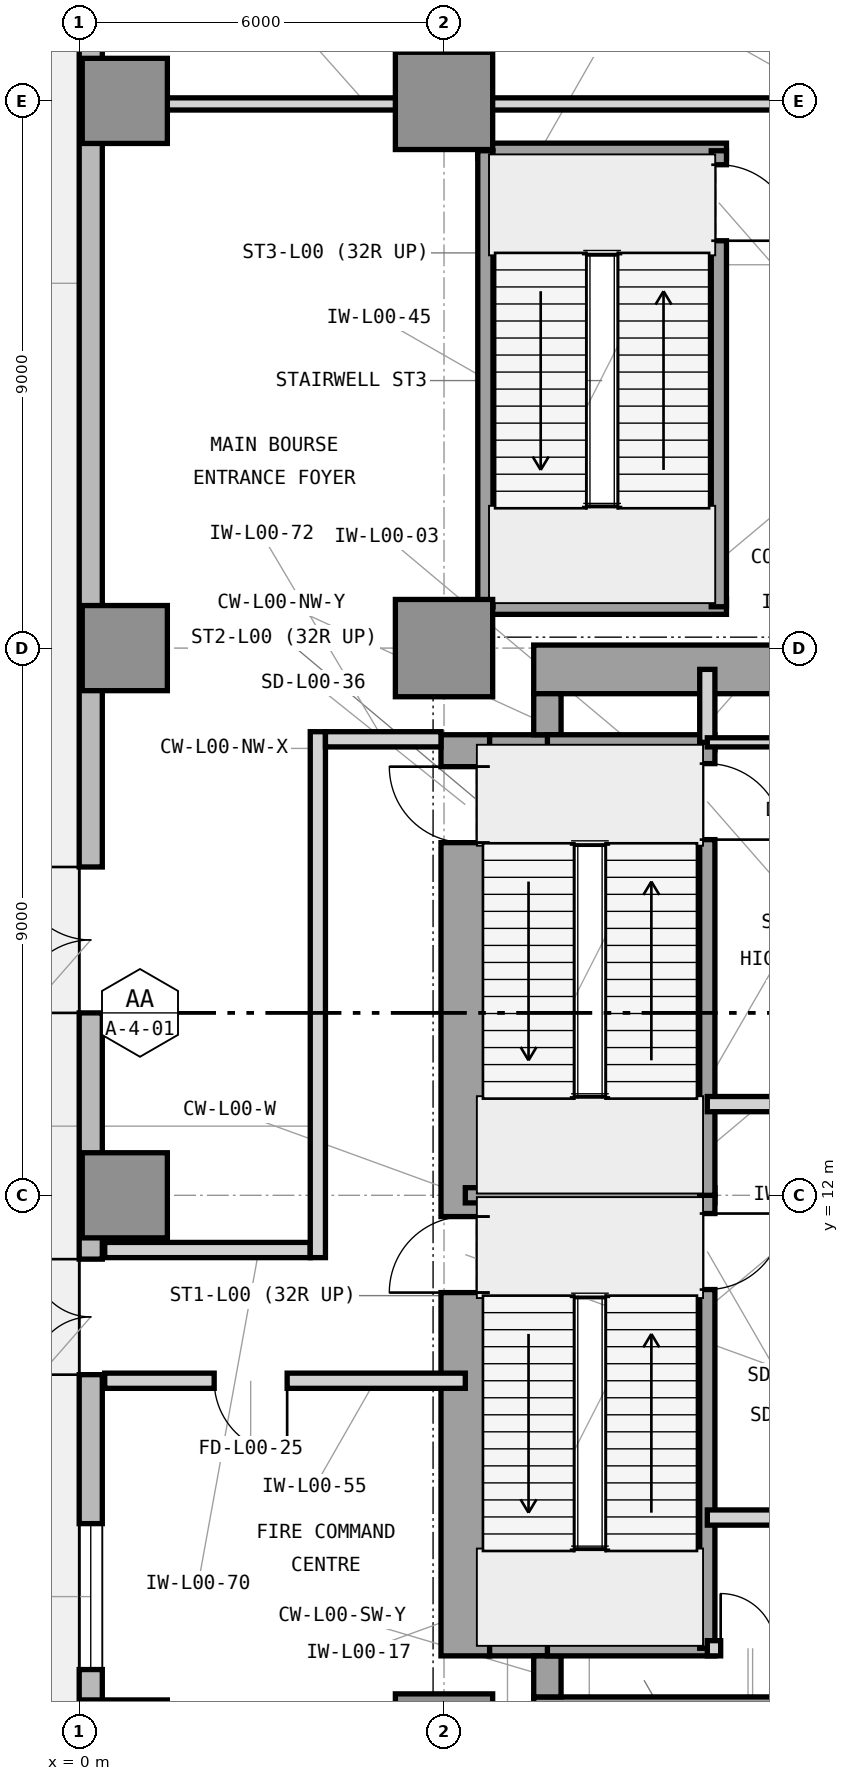
"""IFC4 building model, lengths in metres.
Left out: names, types, materials, properties, quantities, classifications, styles, units other than length and angle.
Written with IfcOpenShell. Run it as: python <this file> out.ifc"""

import sys

from ifc_helpers import new_model, si_unit, direction, frame, frame_2d, origin, origin_2d, place, context, subcontext, project, spatial, rectangle, extrude, element, fill, save


model = new_model("IFC4")
c1 = context("Model", 3, precision=1e-05, world=origin(), true_north=direction((0.0, 1.0)))
c2 = subcontext(c1, "Body", "Model", "MODEL_VIEW")
j1 = project(units=[si_unit("LENGTHUNIT", "METRE"), si_unit("PLANEANGLEUNIT", "RADIAN")], contexts=[c1])
p1 = place(None, origin())
s1 = spatial("IfcSite", under=j1, at=p1, CompositionType="ELEMENT")
p2 = place(p1, origin())
s2 = spatial("IfcBuilding", under=s1, at=p2, CompositionType="ELEMENT")
p3 = place(p2, origin())
s3 = spatial("IfcBuildingStorey", under=s2, at=p3, CompositionType="ELEMENT", Elevation=0.0)
p4 = place(p3, frame((7.475, 3.35, 0.0), z_axis=(0.0, 0.0, 1.0), x_axis=(1.0, 0.0, 0.0)))
e1 = element("IfcWall", 1, at=p4, inside=s3, PredefinedType="SHEAR", context=c2, shape_type="SweptSolid", body=[
    extrude(rectangle(XDim=16.575, YDim=0.8, at=frame_2d((8.288, 0.0))), origin(), (0.0, 0.0, 1.0), 5.4),
])
p5 = place(p3, frame((6.35, 4.425, 0.0), z_axis=(0.0, 0.0, 1.0), x_axis=(0.0, 1.0, 0.0)))
e2 = element("IfcWall", 2, at=p5, inside=s3, PredefinedType="SHEAR", context=c2, shape_type="SweptSolid", body=[
    extrude(rectangle(XDim=15.15, YDim=0.8, at=frame_2d((7.575, 0.0))), origin(), (0.0, 0.0, 1.0), 5.4),
])
p6 = place(p5, frame((5.975, 0.0, 0.0)))
e3 = element("IfcOpeningElement", 3, at=p6, cuts=e2, PredefinedType="OPENING", context=c2, shape_type="SweptSolid", body=[
    extrude(rectangle(XDim=1.25, YDim=2.2, at=frame_2d((0.625, 1.1))), frame((0.0, 0.41, 0.0), z_axis=(0.0, -1.0, 0.0), x_axis=(1.0, 0.0, 0.0)), (0.0, 0.0, 1.0), 0.82),
])
p7 = place(p5, frame((13.375, 0.0, 0.0)))
e4 = element("IfcOpeningElement", 4, at=p7, cuts=e2, PredefinedType="OPENING", context=c2, shape_type="SweptSolid", body=[
    extrude(rectangle(XDim=1.25, YDim=2.2, at=frame_2d((0.625, 1.1))), frame((0.0, 0.41, 0.0), z_axis=(0.0, -1.0, 0.0), x_axis=(1.0, 0.0, 0.0)), (0.0, 0.0, 1.0), 0.82),
])
p8 = place(p3, frame((7.475, 20.65, 0.0), z_axis=(0.0, 0.0, 1.0), x_axis=(1.0, 0.0, 0.0)))
e5 = element("IfcWall", 5, at=p8, inside=s3, PredefinedType="SHEAR", context=c2, shape_type="SweptSolid", body=[
    extrude(rectangle(XDim=12.325, YDim=0.8, at=frame_2d((6.163, 0.0))), origin(), (0.0, 0.0, 1.0), 5.4),
])
p9 = place(p3, frame((6.75, 4.65, 0.0), z_axis=(0.0, 0.0, 1.0), x_axis=(1.0, 0.0, 0.0)))
e6 = element("IfcWall", 6, at=p9, inside=s3, PredefinedType="SHEAR", context=c2, shape_type="SweptSolid", body=[
    extrude(rectangle(XDim=1.175, YDim=0.45, at=frame_2d((0.587, 0.0))), origin(), (0.0, 0.0, 1.0), 5.4),
])
p10 = place(p3, frame((7.7, 3.75, 0.0), z_axis=(0.0, 0.0, 1.0), x_axis=(0.0, 1.0, 0.0)))
e7 = element("IfcWall", 7, at=p10, inside=s3, PredefinedType="SHEAR", context=c2, shape_type="SweptSolid", body=[
    extrude(rectangle(XDim=0.675, YDim=0.45, at=frame_2d((0.337, 0.0))), origin(), (0.0, 0.0, 1.0), 5.4),
])
p11 = place(p3, frame((6.75, 19.35, 0.0), z_axis=(0.0, 0.0, 1.0), x_axis=(1.0, 0.0, 0.0)))
e8 = element("IfcWall", 8, at=p11, inside=s3, PredefinedType="SHEAR", context=c2, shape_type="SweptSolid", body=[
    extrude(rectangle(XDim=1.175, YDim=0.45, at=frame_2d((0.587, 0.0))), origin(), (0.0, 0.0, 1.0), 5.4),
])
p12 = place(p3, frame((7.7, 19.575, 0.0), z_axis=(0.0, 0.0, 1.0), x_axis=(0.0, 1.0, 0.0)))
e9 = element("IfcWall", 9, at=p12, inside=s3, PredefinedType="SHEAR", context=c2, shape_type="SweptSolid", body=[
    extrude(rectangle(XDim=0.675, YDim=0.45, at=frame_2d((0.337, 0.0))), origin(), (0.0, 0.0, 1.0), 5.4),
])
for number, where, z_axis, x_axis in (
    (10, (0.75, 3.0, 0.0), (0.0, 0.0, 1.0), (1.0, 0.0, 0.0)),
    (11, (0.75, 12.0, 0.0), (0.0, 0.0, 1.0), (1.0, 0.0, 0.0)),
    (12, (0.75, 21.0, 0.0), (0.0, 0.0, 1.0), (1.0, 0.0, 0.0)),
    (13, (0.75, 30.0, 0.0), (0.0, 0.0, 1.0), (1.0, 0.0, 0.0)),
):
    element("IfcColumn", number, at=place(p3, frame(where, z_axis=z_axis, x_axis=x_axis)), inside=s3, PredefinedType="COLUMN", context=c2, shape_type="SweptSolid", body=[
        extrude(rectangle(XDim=1.4, YDim=1.4, at=origin_2d()), origin(), (0.0, 0.0, 1.0), 5.4),
    ])
for number, where, z_axis, x_axis in (
    (14, (6.0, 3.0, 0.0), (0.0, 0.0, 1.0), (1.0, 0.0, 0.0)),
    (15, (6.0, 21.0, 0.0), (0.0, 0.0, 1.0), (1.0, 0.0, 0.0)),
    (16, (6.0, 30.0, 0.0), (0.0, 0.0, 1.0), (1.0, 0.0, 0.0)),
):
    element("IfcColumn", number, at=place(p3, frame(where, z_axis=z_axis, x_axis=x_axis)), inside=s3, PredefinedType="COLUMN", context=c2, shape_type="SweptSolid", body=[
        extrude(rectangle(XDim=1.6, YDim=1.6, at=origin_2d()), origin(), (0.0, 0.0, 1.0), 5.4),
    ])
p13 = place(p3, frame((0.19, 51.0, 0.0), z_axis=(0.0, 0.0, 1.0), x_axis=(0.0, -1.0, 0.0)))
e17 = element("IfcWall", 17, at=p13, inside=s3, PredefinedType="STANDARD", context=c2, shape_type="SweptSolid", body=[
    extrude(rectangle(XDim=48.0, YDim=0.38, at=frame_2d((24.0, 0.0))), origin(), (0.0, 0.0, 1.0), 5.1),
])
p14 = place(p13, frame((33.6, 0.0, 0.0)))
e18 = element("IfcOpeningElement", 18, at=p14, cuts=e17, PredefinedType="OPENING", context=c2, shape_type="SweptSolid", body=[
    extrude(rectangle(XDim=2.4, YDim=2.8, at=frame_2d((1.2, 1.4))), frame((0.0, 0.2, 0.0), z_axis=(0.0, -1.0, 0.0), x_axis=(1.0, 0.0, 0.0)), (0.0, 0.0, 1.0), 0.4),
])
p15 = place(p13, frame((40.05, 0.0, 0.0)))
e19 = element("IfcOpeningElement", 19, at=p15, cuts=e17, PredefinedType="OPENING", context=c2, shape_type="SweptSolid", body=[
    extrude(rectangle(XDim=1.9, YDim=2.4, at=frame_2d((0.95, 1.2))), frame((0.0, 0.2, 0.0), z_axis=(0.0, -1.0, 0.0), x_axis=(1.0, 0.0, 0.0)), (0.0, 0.0, 1.0), 0.4),
])
p16 = place(p13, frame((44.4, 0.0, 1.0)))
e20 = element("IfcOpeningElement", 20, at=p16, cuts=e17, PredefinedType="OPENING", context=c2, shape_type="SweptSolid", body=[
    extrude(rectangle(XDim=2.4, YDim=2.9, at=frame_2d((1.2, 1.45))), frame((0.0, 0.2, 0.0), z_axis=(0.0, -1.0, 0.0), x_axis=(1.0, 0.0, 0.0)), (0.0, 0.0, 1.0), 0.4),
])
p17 = place(p3, frame((6.35, 12.0, 0.0), z_axis=(0.0, 0.0, 1.0), x_axis=(1.0, 0.0, 0.0)))
e21 = element("IfcWall", 21, at=p17, inside=s3, PredefinedType="SHEAR", context=c2, shape_type="SweptSolid", body=[
    extrude(rectangle(XDim=4.105, YDim=0.25, at=frame_2d((2.052, 0.0))), origin(), (0.0, 0.0, 1.0), 5.4),
])
for number, where, z_axis, x_axis in (
    (22, (7.7, 4.55, 0.0), (0.0, 0.0, 1.0), (1.0, 0.0, 0.0)),
    (23, (7.7, 19.45, 0.0), (0.0, 0.0, 1.0), (1.0, 0.0, 0.0)),
):
    element("IfcWall", number, at=place(p3, frame(where, z_axis=z_axis, x_axis=x_axis)), inside=s3, PredefinedType="SHEAR", context=c2, shape_type="SweptSolid", body=[
        extrude(rectangle(XDim=2.755, YDim=0.25, at=frame_2d((1.377, 0.0))), origin(), (0.0, 0.0, 1.0), 5.4),
    ])
p18 = place(p3, frame((10.33, 4.55, 0.0), z_axis=(0.0, 0.0, 1.0), x_axis=(0.0, 1.0, 0.0)))
e24 = element("IfcWall", 24, at=p18, inside=s3, PredefinedType="SHEAR", context=c2, shape_type="SweptSolid", body=[
    extrude(rectangle(XDim=7.45, YDim=0.25, at=frame_2d((3.725, 0.0))), origin(), (0.0, 0.0, 1.0), 5.4),
])
p19 = place(p18, frame((5.9, 0.0, 0.0)))
e25 = element("IfcOpeningElement", 25, at=p19, cuts=e24, PredefinedType="OPENING", context=c2, shape_type="SweptSolid", body=[
    extrude(rectangle(XDim=1.25, YDim=2.2, at=frame_2d((0.625, 1.1))), frame((0.0, 0.135, 0.0), z_axis=(0.0, -1.0, 0.0), x_axis=(1.0, 0.0, 0.0)), (0.0, 0.0, 1.0), 0.27),
])
p20 = place(p3, frame((10.33, 12.0, 0.0), z_axis=(0.0, 0.0, 1.0), x_axis=(0.0, 1.0, 0.0)))
e26 = element("IfcWall", 26, at=p20, inside=s3, PredefinedType="SHEAR", context=c2, shape_type="SweptSolid", body=[
    extrude(rectangle(XDim=7.45, YDim=0.25, at=frame_2d((3.725, 0.0))), origin(), (0.0, 0.0, 1.0), 5.4),
])
p21 = place(p20, frame((5.85, 0.0, 0.0)))
e27 = element("IfcOpeningElement", 27, at=p21, cuts=e26, PredefinedType="OPENING", context=c2, shape_type="SweptSolid", body=[
    extrude(rectangle(XDim=1.25, YDim=2.2, at=frame_2d((0.625, 1.1))), frame((0.0, 0.135, 0.0), z_axis=(0.0, -1.0, 0.0), x_axis=(1.0, 0.0, 0.0)), (0.0, 0.0, 1.0), 0.27),
])
p22 = place(p3, frame((10.33, 4.55, 0.0), z_axis=(0.0, 0.0, 1.0), x_axis=(1.0, 0.0, 0.0)))
e28 = element("IfcWall", 28, at=p22, inside=s3, PredefinedType="PARTITIONING", context=c2, shape_type="SweptSolid", body=[
    extrude(rectangle(XDim=1.49, YDim=0.25, at=frame_2d((0.745, 0.0))), origin(), (0.0, 0.0, 1.0), 5.09),
])
p23 = place(p22, frame((0.22, 0.0, 0.0)))
e29 = element("IfcOpeningElement", 29, at=p23, cuts=e28, PredefinedType="OPENING", context=c2, shape_type="SweptSolid", body=[
    extrude(rectangle(XDim=0.9, YDim=2.1, at=frame_2d((0.45, 1.05))), frame((0.0, 0.135, 0.0), z_axis=(0.0, -1.0, 0.0), x_axis=(1.0, 0.0, 0.0)), (0.0, 0.0, 1.0), 0.27),
])
p24 = place(p3, frame((10.33, 19.45, 0.0), z_axis=(0.0, 0.0, 1.0), x_axis=(0.0, 1.0, 0.0)))
e30 = element("IfcWall", 30, at=p24, inside=s3, PredefinedType="PARTITIONING", context=c2, shape_type="SweptSolid", body=[
    extrude(rectangle(XDim=1.2, YDim=0.25, at=frame_2d((0.6, 0.0))), origin(), (0.0, 0.0, 1.0), 4.234),
])
p25 = place(p3, frame((10.33, 13.5, 0.0), z_axis=(0.0, 0.0, 1.0), x_axis=(1.0, 0.0, 0.0)))
e31 = element("IfcWall", 31, at=p25, inside=s3, PredefinedType="PARTITIONING", context=c2, shape_type="SweptSolid", body=[
    extrude(rectangle(XDim=1.62, YDim=0.25, at=frame_2d((0.81, 0.0))), origin(), (0.0, 0.0, 1.0), 4.473),
])
p26 = place(p3, frame((10.33, 6.7, 0.0), z_axis=(0.0, 0.0, 1.0), x_axis=(1.0, 0.0, 0.0)))
e32 = element("IfcWall", 32, at=p26, inside=s3, PredefinedType="PARTITIONING", context=c2, shape_type="SweptSolid", body=[
    extrude(rectangle(XDim=1.49, YDim=0.25, at=frame_2d((0.745, 0.0))), origin(), (0.0, 0.0, 1.0), 4.473),
])
p27 = place(p3, frame((10.33, 19.45, 0.0), z_axis=(0.0, 0.0, 1.0), x_axis=(1.0, 0.0, 0.0)))
e33 = element("IfcWall", 33, at=p27, inside=s3, PredefinedType="PARTITIONING", context=c2, shape_type="SweptSolid", body=[
    extrude(rectangle(XDim=3.82, YDim=0.15, at=frame_2d((1.91, 0.0))), origin(), (0.0, 0.0, 1.0), 5.09),
])
p28 = place(p27, frame((1.25, 0.0, 0.0)))
e34 = element("IfcOpeningElement", 34, at=p28, cuts=e33, PredefinedType="OPENING", context=c2, shape_type="SweptSolid", body=[
    extrude(rectangle(XDim=0.95, YDim=2.1, at=frame_2d((0.475, 1.05))), frame((0.0, 0.085, 0.0), z_axis=(0.0, -1.0, 0.0), x_axis=(1.0, 0.0, 0.0)), (0.0, 0.0, 1.0), 0.17),
])
for number, where, z_axis, x_axis in (
    (35, (6.555, 21.68, 0.0), (0.0, 0.0, 1.0), (1.0, 0.0, 0.0)),
    (36, (6.555, 29.18, 0.0), (0.0, 0.0, 1.0), (1.0, 0.0, 0.0)),
):
    element("IfcWall", number, at=place(p3, frame(where, z_axis=z_axis, x_axis=x_axis)), inside=s3, PredefinedType="SHEAR", context=c2, shape_type="SweptSolid", body=[
        extrude(rectangle(XDim=4.09, YDim=0.25, at=frame_2d((2.045, 0.0))), origin(), (0.0, 0.0, 1.0), 5.4),
    ])
p29 = place(p3, frame((6.68, 21.68, 0.0), z_axis=(0.0, 0.0, 1.0), x_axis=(0.0, 1.0, 0.0)))
e37 = element("IfcWall", 37, at=p29, inside=s3, PredefinedType="SHEAR", context=c2, shape_type="SweptSolid", body=[
    extrude(rectangle(XDim=7.5, YDim=0.25, at=frame_2d((3.75, 0.0))), origin(), (0.0, 0.0, 1.0), 5.4),
])
p30 = place(p3, frame((10.52, 21.68, 0.0), z_axis=(0.0, 0.0, 1.0), x_axis=(0.0, 1.0, 0.0)))
e38 = element("IfcWall", 38, at=p30, inside=s3, PredefinedType="SHEAR", context=c2, shape_type="SweptSolid", body=[
    extrude(rectangle(XDim=7.5, YDim=0.25, at=frame_2d((3.75, 0.0))), origin(), (0.0, 0.0, 1.0), 5.4),
])
p31 = place(p30, frame((6.02, 0.0, 0.0)))
e39 = element("IfcOpeningElement", 39, at=p31, cuts=e38, PredefinedType="OPENING", context=c2, shape_type="SweptSolid", body=[
    extrude(rectangle(XDim=1.25, YDim=2.2, at=frame_2d((0.625, 1.1))), frame((0.0, 0.135, 0.0), z_axis=(0.0, -1.0, 0.0), x_axis=(1.0, 0.0, 0.0)), (0.0, 0.0, 1.0), 0.27),
])
p32 = place(p3, frame((0.42, 8.95, 0.0), z_axis=(0.0, 0.0, 1.0), x_axis=(1.0, 0.0, 0.0)))
e40 = element("IfcWall", 40, at=p32, inside=s3, PredefinedType="PARTITIONING", context=c2, shape_type="SweptSolid", body=[
    extrude(rectangle(XDim=5.93, YDim=0.25, at=frame_2d((2.965, 0.0))), origin(), (0.0, 0.0, 1.0), 4.473),
])
p33 = place(p32, frame((1.8, 0.0, 0.0)))
e41 = element("IfcOpeningElement", 41, at=p33, cuts=e40, PredefinedType="OPENING", context=c2, shape_type="SweptSolid", body=[
    extrude(rectangle(XDim=1.2, YDim=2.2, at=frame_2d((0.6, 1.1))), frame((0.0, 0.135, 0.0), z_axis=(0.0, -1.0, 0.0), x_axis=(1.0, 0.0, 0.0)), (0.0, 0.0, 1.0), 0.27),
])
p34 = place(p3, frame((0.42, 29.95, 0.0), z_axis=(0.0, 0.0, 1.0), x_axis=(1.0, 0.0, 0.0)))
e42 = element("IfcWall", 42, at=p34, inside=s3, PredefinedType="PARTITIONING", context=c2, shape_type="SweptSolid", body=[
    extrude(rectangle(XDim=17.23, YDim=0.2, at=frame_2d((8.615, 0.0))), origin(), (0.0, 0.0, 1.0), 4.234),
])
p35 = place(p34, frame((11.1, 0.0, 0.0)))
e43 = element("IfcOpeningElement", 43, at=p35, cuts=e42, PredefinedType="OPENING", context=c2, shape_type="SweptSolid", body=[
    extrude(rectangle(XDim=2.0, YDim=2.5, at=frame_2d((1.0, 1.25))), frame((0.0, 0.11, 0.0), z_axis=(0.0, -1.0, 0.0), x_axis=(1.0, 0.0, 0.0)), (0.0, 0.0, 1.0), 0.22),
])
p36 = place(p3, frame((0.42, 11.1, 0.0), z_axis=(0.0, 0.0, 1.0), x_axis=(1.0, 0.0, 0.0)))
e44 = element("IfcWall", 44, at=p36, inside=s3, PredefinedType="PARTITIONING", context=c2, shape_type="SweptSolid", body=[
    extrude(rectangle(XDim=3.38, YDim=0.25, at=frame_2d((1.69, 0.0))), origin(), (0.0, 0.0, 1.0), 5.09),
])
p37 = place(p3, frame((3.925, 10.975, 0.0), z_axis=(0.0, 0.0, 1.0), x_axis=(0.0, 1.0, 0.0)))
e45 = element("IfcWall", 45, at=p37, inside=s3, PredefinedType="PARTITIONING", context=c2, shape_type="SweptSolid", body=[
    extrude(rectangle(XDim=8.65, YDim=0.25, at=frame_2d((4.325, 0.0))), origin(), (0.0, 0.0, 1.0), 5.09),
])
p38 = place(p3, frame((4.05, 19.5, 0.0), z_axis=(0.0, 0.0, 1.0), x_axis=(1.0, 0.0, 0.0)))
e46 = element("IfcWall", 46, at=p38, inside=s3, PredefinedType="PARTITIONING", context=c2, shape_type="SweptSolid", body=[
    extrude(rectangle(XDim=1.9, YDim=0.25, at=frame_2d((0.95, 0.0))), origin(), (0.0, 0.0, 1.0), 5.09),
])
p39 = place(p14, frame((2.4, 0.0, 0.0), z_axis=(0.0, 0.0, 1.0), x_axis=(-1.0, 0.0, 0.0)))
e47 = element("IfcDoor", 47, at=p39, inside=s3, OperationType="DOUBLE_DOOR_SINGLE_SWING", PredefinedType="DOOR", context=c2, shape_type="SweptSolid", body=[
    extrude(rectangle(XDim=2.4, YDim=2.8, at=frame_2d((1.2, 1.4))), frame((0.0, 0.025, 0.0), z_axis=(0.0, -1.0, 0.0), x_axis=(1.0, 0.0, 0.0)), (0.0, 0.0, 1.0), 0.05),
])
fill(e18, e47)
p40 = place(p15, frame((1.9, 0.0, 0.0), z_axis=(0.0, 0.0, 1.0), x_axis=(-1.0, 0.0, 0.0)))
e48 = element("IfcDoor", 48, at=p40, inside=s3, OperationType="DOUBLE_DOOR_SINGLE_SWING", PredefinedType="DOOR", context=c2, shape_type="SweptSolid", body=[
    extrude(rectangle(XDim=1.9, YDim=2.4, at=frame_2d((0.95, 1.2))), frame((0.0, 0.025, 0.0), z_axis=(0.0, -1.0, 0.0), x_axis=(1.0, 0.0, 0.0)), (0.0, 0.0, 1.0), 0.05),
])
fill(e19, e48)
p41 = place(p16, origin())
e49 = element("IfcWindow", 49, at=p41, inside=s3, PartitioningType="SINGLE_PANEL", PredefinedType="WINDOW", context=c2, shape_type="SweptSolid", body=[
    extrude(rectangle(XDim=2.4, YDim=2.9, at=frame_2d((1.2, 1.45))), frame((0.0, 0.11, 0.0), z_axis=(0.0, -1.0, 0.0), x_axis=(1.0, 0.0, 0.0)), (0.0, 0.0, 1.0), 0.06),
])
fill(e20, e49)
p42 = place(p19, frame((1.25, 0.0, 0.0), z_axis=(0.0, 0.0, 1.0), x_axis=(-1.0, 0.0, 0.0)))
e50 = element("IfcDoor", 50, at=p42, inside=s3, OperationType="SINGLE_SWING_LEFT", PredefinedType="DOOR", context=c2, shape_type="SweptSolid", body=[
    extrude(rectangle(XDim=1.25, YDim=2.2, at=frame_2d((0.625, 1.1))), frame((0.0, 0.025, 0.0), z_axis=(0.0, -1.0, 0.0), x_axis=(1.0, 0.0, 0.0)), (0.0, 0.0, 1.0), 0.05),
])
fill(e25, e50)
p43 = place(p21, frame((1.25, 0.0, 0.0), z_axis=(0.0, 0.0, 1.0), x_axis=(-1.0, 0.0, 0.0)))
e51 = element("IfcDoor", 51, at=p43, inside=s3, OperationType="SINGLE_SWING_RIGHT", PredefinedType="DOOR", context=c2, shape_type="SweptSolid", body=[
    extrude(rectangle(XDim=1.25, YDim=2.2, at=frame_2d((0.625, 1.1))), frame((0.0, 0.025, 0.0), z_axis=(0.0, -1.0, 0.0), x_axis=(1.0, 0.0, 0.0)), (0.0, 0.0, 1.0), 0.05),
])
fill(e27, e51)
p44 = place(p23, origin())
e52 = element("IfcDoor", 52, at=p44, inside=s3, OperationType="SINGLE_SWING_LEFT", PredefinedType="TRAPDOOR", context=c2, shape_type="SweptSolid", body=[
    extrude(rectangle(XDim=0.9, YDim=2.1, at=frame_2d((0.45, 1.05))), frame((0.0, 0.025, 0.0), z_axis=(0.0, -1.0, 0.0), x_axis=(1.0, 0.0, 0.0)), (0.0, 0.0, 1.0), 0.05),
])
fill(e29, e52)
p45 = place(p31, frame((1.25, 0.0, 0.0), z_axis=(0.0, 0.0, 1.0), x_axis=(-1.0, 0.0, 0.0)))
e53 = element("IfcDoor", 53, at=p45, inside=s3, OperationType="SINGLE_SWING_RIGHT", PredefinedType="DOOR", context=c2, shape_type="SweptSolid", body=[
    extrude(rectangle(XDim=1.25, YDim=2.2, at=frame_2d((0.625, 1.1))), frame((0.0, 0.025, 0.0), z_axis=(0.0, -1.0, 0.0), x_axis=(1.0, 0.0, 0.0)), (0.0, 0.0, 1.0), 0.05),
])
fill(e39, e53)
p46 = place(p33, frame((1.2, 0.0, 0.0), z_axis=(0.0, 0.0, 1.0), x_axis=(-1.0, 0.0, 0.0)))
e54 = element("IfcDoor", 54, at=p46, inside=s3, OperationType="SINGLE_SWING_LEFT", PredefinedType="DOOR", context=c2, shape_type="SweptSolid", body=[
    extrude(rectangle(XDim=1.2, YDim=2.2, at=frame_2d((0.6, 1.1))), frame((0.0, 0.025, 0.0), z_axis=(0.0, -1.0, 0.0), x_axis=(1.0, 0.0, 0.0)), (0.0, 0.0, 1.0), 0.05),
])
fill(e41, e54)
p47 = place(p6, origin())
e55 = element("IfcDoor", 55, at=p47, inside=s3, OperationType="SINGLE_SWING_LEFT", PredefinedType="DOOR", context=c2, shape_type="SweptSolid", body=[
    extrude(rectangle(XDim=1.25, YDim=2.2, at=frame_2d((0.625, 1.1))), frame((0.0, 0.025, 0.0), z_axis=(0.0, -1.0, 0.0), x_axis=(1.0, 0.0, 0.0)), (0.0, 0.0, 1.0), 0.05),
])
fill(e3, e55)
p48 = place(p7, origin())
e56 = element("IfcDoor", 56, at=p48, inside=s3, OperationType="SINGLE_SWING_RIGHT", PredefinedType="DOOR", context=c2, shape_type="SweptSolid", body=[
    extrude(rectangle(XDim=1.25, YDim=2.2, at=frame_2d((0.625, 1.1))), frame((0.0, 0.025, 0.0), z_axis=(0.0, -1.0, 0.0), x_axis=(1.0, 0.0, 0.0)), (0.0, 0.0, 1.0), 0.05),
])
fill(e4, e56)
save(model, sys.argv[1])
